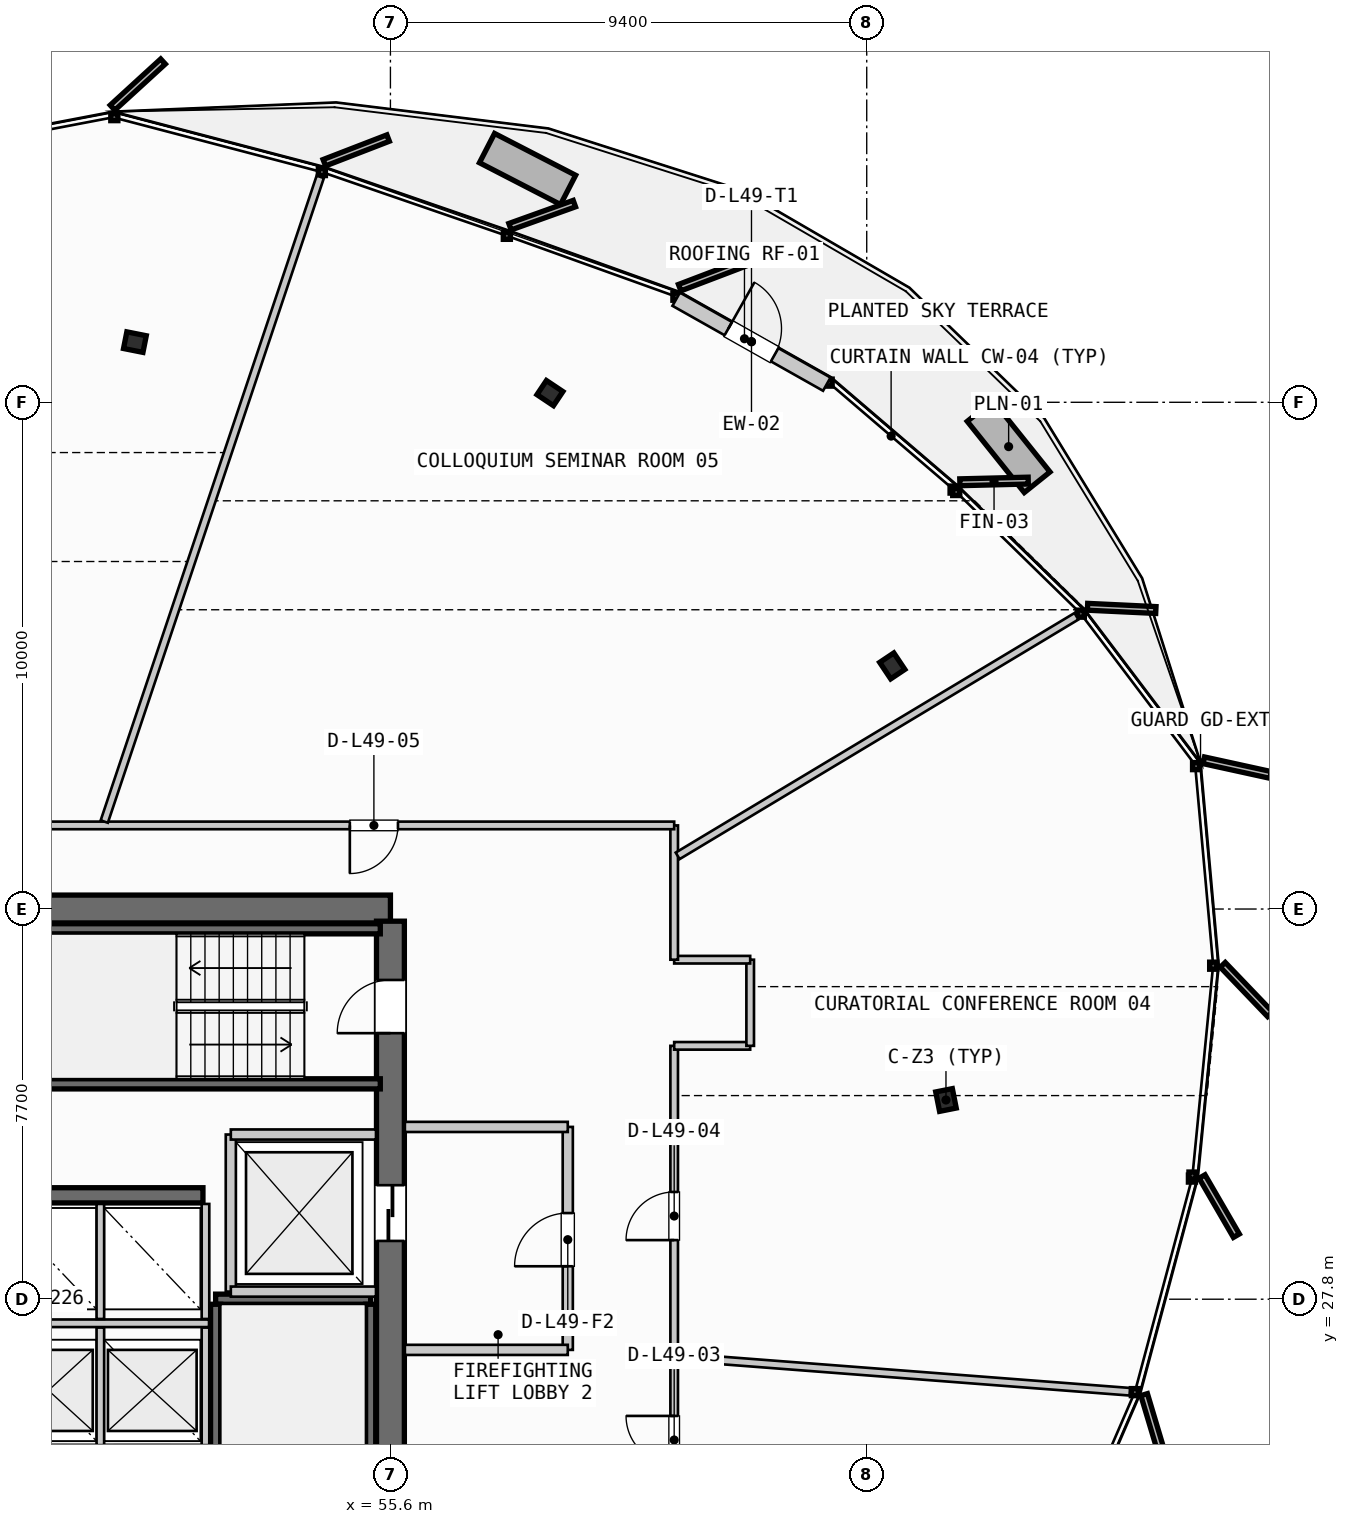
"""IFC4 building model, lengths in metres.
Left out: names, types, materials, properties, quantities, classifications, styles, units other than length and angle.
Written with IfcOpenShell. Run it as: python <this file> out.ifc"""

import sys

from ifc_helpers import new_model, si_unit, direction, frame, frame_2d, origin, origin_2d, place, context, subcontext, project, spatial, rectangle, i_section, extrude, source, transform, mapped, element, fill, save


model = new_model("IFC4")
c1 = context("Model", 3, precision=1e-05, world=origin(), true_north=direction((0.0, 1.0)))
c2 = subcontext(c1, "Body", "Model", "MODEL_VIEW")
j1 = project(units=[si_unit("LENGTHUNIT", "METRE"), si_unit("PLANEANGLEUNIT", "RADIAN")], contexts=[c1])
p1 = place(None, origin())
s1 = spatial("IfcSite", under=j1, at=p1, CompositionType="ELEMENT")
p2 = place(p1, origin())
s2 = spatial("IfcBuilding", under=s1, at=p2, CompositionType="ELEMENT")
p3 = place(p2, frame((0.0, 0.0, 190.4)))
s3 = spatial("IfcBuildingStorey", under=s2, at=p3, CompositionType="ELEMENT", Elevation=190.4)
p4 = place(p3, frame((55.6, 35.5, 0.0), z_axis=(0.0, 0.0, 1.0), x_axis=(-1.0, 0.0, 0.0)))
e1 = element("IfcWall", 1, at=p4, inside=s3, PredefinedType="SHEAR", context=c2, shape_type="SweptSolid", body=[
    extrude(rectangle(XDim=17.6, YDim=0.55, at=frame_2d((8.8, 0.0))), origin(), (0.0, 0.0, 1.0), 3.26),
])
p5 = place(p4, frame((8.05, 0.0, 0.0)))
e2 = element("IfcOpeningElement", 2, at=p5, cuts=e1, PredefinedType="OPENING", context=c2, shape_type="SweptSolid", body=[
    extrude(rectangle(XDim=1.5, YDim=2.2, at=frame_2d((0.75, 1.1))), frame((0.0, 0.285, 0.0), z_axis=(0.0, -1.0, 0.0), x_axis=(1.0, 0.0, 0.0)), (0.0, 0.0, 1.0), 0.57),
])
p6 = place(p4, frame((15.85, 0.0, 0.0)))
e3 = element("IfcOpeningElement", 3, at=p6, cuts=e1, PredefinedType="OPENING", context=c2, shape_type="SweptSolid", body=[
    extrude(rectangle(XDim=0.85, YDim=2.15, at=frame_2d((0.425, 1.075))), frame((0.0, 0.285, 0.0), z_axis=(0.0, -1.0, 0.0), x_axis=(1.0, 0.0, 0.0)), (0.0, 0.0, 1.0), 0.57),
])
p7 = place(p4, frame((14.35, 0.0, 0.0)))
e4 = element("IfcOpeningElement", 4, at=p7, cuts=e1, PredefinedType="OPENING", context=c2, shape_type="SweptSolid", body=[
    extrude(rectangle(XDim=0.85, YDim=2.15, at=frame_2d((0.425, 1.075))), frame((0.0, 0.285, 0.0), z_axis=(0.0, -1.0, 0.0), x_axis=(1.0, 0.0, 0.0)), (0.0, 0.0, 1.0), 0.57),
])
p8 = place(p4, frame((12.3, 0.0, 0.0)))
e5 = element("IfcOpeningElement", 5, at=p8, cuts=e1, PredefinedType="OPENING", context=c2, shape_type="SweptSolid", body=[
    extrude(rectangle(XDim=0.95, YDim=2.15, at=frame_2d((0.475, 1.075))), frame((0.0, 0.285, 0.0), z_axis=(0.0, -1.0, 0.0), x_axis=(1.0, 0.0, 0.0)), (0.0, 0.0, 1.0), 0.57),
])
p9 = place(p4, frame((10.2, 0.0, 0.0)))
e6 = element("IfcOpeningElement", 6, at=p9, cuts=e1, PredefinedType="OPENING", context=c2, shape_type="SweptSolid", body=[
    extrude(rectangle(XDim=0.9, YDim=2.15, at=frame_2d((0.45, 1.075))), frame((0.0, 0.285, 0.0), z_axis=(0.0, -1.0, 0.0), x_axis=(1.0, 0.0, 0.0)), (0.0, 0.0, 1.0), 0.57),
])
p10 = place(p3, frame((55.6, 20.34, 0.0), z_axis=(0.0, 0.0, 1.0), x_axis=(0.0, 1.0, 0.0)))
e7 = element("IfcWall", 7, at=p10, inside=s3, PredefinedType="SHEAR", context=c2, shape_type="SweptSolid", body=[
    extrude(rectangle(XDim=14.92, YDim=0.55, at=frame_2d((7.46, 0.0))), origin(), (0.0, 0.0, 1.0), 3.26),
])
p11 = place(p10, frame((12.71, 0.0, 0.0)))
e8 = element("IfcOpeningElement", 8, at=p11, cuts=e7, PredefinedType="OPENING", context=c2, shape_type="SweptSolid", body=[
    extrude(rectangle(XDim=1.05, YDim=2.15, at=frame_2d((0.525, 1.075))), frame((0.0, 0.285, 0.0), z_axis=(0.0, -1.0, 0.0), x_axis=(1.0, 0.0, 0.0)), (0.0, 0.0, 1.0), 0.57),
])
p12 = place(p10, frame((8.61, 0.0, 0.0)))
e9 = element("IfcOpeningElement", 9, at=p12, cuts=e7, PredefinedType="OPENING", context=c2, shape_type="SweptSolid", body=[
    extrude(rectangle(XDim=1.1, YDim=2.2, at=frame_2d((0.55, 1.1))), frame((0.0, 0.285, 0.0), z_axis=(0.0, -1.0, 0.0), x_axis=(1.0, 0.0, 0.0)), (0.0, 0.0, 1.0), 0.57),
])
p13 = place(p3, frame((47.65, 29.85, 0.0), z_axis=(0.0, 0.0, 1.0), x_axis=(1.0, 0.0, 0.0)))
e10 = element("IfcWall", 10, at=p13, inside=s3, PredefinedType="SHEAR", context=c2, shape_type="SweptSolid", body=[
    extrude(rectangle(XDim=4.25, YDim=0.3, at=frame_2d((2.125, 0.0))), origin(), (0.0, 0.0, 1.0), 3.26),
])
m1 = source(origin(), c2, "Body", "SweptSolid", [
    extrude(i_section(OverallWidth=0.391, OverallDepth=0.335, WebThickness=0.023, FlangeThickness=0.034, FilletRadius=0.015, at=origin_2d()), origin(), (0.0, 0.0, 1.0), 3.26),
])
for number, where, z_axis, x_axis in (
    (11, (66.564, 31.731, 0.0), (0.0, 0.0, 1.0), (0.981, 0.195, 0.0)),
    (12, (65.504, 40.298, 0.0), (0.0, 0.0, 1.0), (0.831, 0.556, 0.0)),
    (13, (58.748, 45.681, 0.0), (0.0, 0.0, 1.0), (0.556, 0.831, 0.0)),
    (14, (50.557, 46.688, 0.0), (0.0, 0.0, 1.0), (0.195, 0.981, 0.0)),
):
    element("IfcColumn", number, at=place(p3, frame(where, z_axis=z_axis, x_axis=x_axis)), inside=s3, PredefinedType="COLUMN", context=c2, shape_type="MappedRepresentation", body=[
        mapped(m1, transform((0.0, 0.0, 0.0), scale=1.0)),
    ])
p14 = place(p3, frame((61.24, 47.534, 0.0), z_axis=(0.0, 0.0, 1.0), x_axis=(0.870990242998, -0.491300312031, 0.0)))
e15 = element("IfcWall", 15, at=p14, inside=s3, PredefinedType="SOLIDWALL", context=c2, shape_type="SweptSolid", body=[
    extrude(rectangle(XDim=3.412, YDim=0.3, at=frame_2d((1.706, 0.0))), origin(), (0.0, 0.0, 1.0), 2.735),
])
p15 = place(p14, frame((1.181, 0.0, 0.0)))
e16 = element("IfcOpeningElement", 16, at=p15, cuts=e15, PredefinedType="OPENING", context=c2, shape_type="SweptSolid", body=[
    extrude(rectangle(XDim=1.05, YDim=2.2, at=frame_2d((0.525, 1.1))), frame((0.0, 0.16, 0.0), z_axis=(0.0, -1.0, 0.0), x_axis=(1.0, 0.0, 0.0)), (0.0, 0.0, 1.0), 0.32),
])
p16 = place(p3, frame((52.15, 27.8, 0.0), z_axis=(0.0, 0.0, 1.0), x_axis=(1.0, 0.0, 0.0)))
e17 = element("IfcWall", 17, at=p16, inside=s3, PredefinedType="SHEAR", context=c2, shape_type="SweptSolid", body=[
    extrude(rectangle(XDim=3.06, YDim=0.2, at=frame_2d((1.53, 0.0))), origin(), (0.0, 0.0, 1.0), 3.26),
])
for number, where, z_axis, x_axis in (
    (18, (55.21, 27.7, 0.0), (0.0, 0.0, 1.0), (0.0, -1.0, 0.0)),
    (19, (52.15, 20.35, 0.0), (0.0, 0.0, 1.0), (0.0, 1.0, 0.0)),
    (20, (48.05, 35.11, 0.0), (0.0, 0.0, 1.0), (1.0, 0.0, 0.0)),
    (21, (55.4, 32.05, 0.0), (0.0, 0.0, 1.0), (-1.0, 0.0, 0.0)),
):
    element("IfcWall", number, at=place(p3, frame(where, z_axis=z_axis, x_axis=x_axis)), inside=s3, PredefinedType="SHEAR", context=c2, shape_type="SweptSolid", body=[
        extrude(rectangle(XDim=7.35, YDim=0.2, at=frame_2d((3.675, 0.0))), origin(), (0.0, 0.0, 1.0), 3.26),
    ])
p17 = place(p3, frame((52.45, 27.95, 0.0), z_axis=(0.0, 0.0, 1.0), x_axis=(0.0, 1.0, 0.0)))
e22 = element("IfcWall", 22, at=p17, inside=s3, PredefinedType="PARTITIONING", context=c2, shape_type="SweptSolid", body=[
    extrude(rectangle(XDim=3.1, YDim=0.2, at=frame_2d((1.55, 0.0))), origin(), (0.0, 0.0, 1.0), 2.735),
])
for number, where, z_axis, x_axis in (
    (23, (52.45, 27.95, 0.0), (0.0, 0.0, 1.0), (1.0, 0.0, 0.0)),
    (24, (52.45, 31.05, 0.0), (0.0, 0.0, 1.0), (1.0, 0.0, 0.0)),
):
    element("IfcWall", number, at=place(p3, frame(where, z_axis=z_axis, x_axis=x_axis)), inside=s3, PredefinedType="PARTITIONING", context=c2, shape_type="SweptSolid", body=[
        extrude(rectangle(XDim=2.865, YDim=0.2, at=frame_2d((1.433, 0.0))), origin(), (0.0, 0.0, 1.0), 2.735),
    ])
p18 = place(p3, frame((59.1, 26.8, 0.0), z_axis=(0.0, 0.0, 1.0), x_axis=(0.0, 1.0, 0.0)))
e25 = element("IfcWall", 25, at=p18, inside=s3, PredefinedType="PARTITIONING", context=c2, shape_type="SweptSolid", body=[
    extrude(rectangle(XDim=4.4, YDim=0.2, at=frame_2d((2.2, 0.0))), origin(), (0.0, 0.0, 1.0), 2.735),
])
p19 = place(p18, frame((1.65, 0.0, 0.0)))
e26 = element("IfcOpeningElement", 26, at=p19, cuts=e25, PredefinedType="OPENING", context=c2, shape_type="SweptSolid", body=[
    extrude(rectangle(XDim=1.05, YDim=2.15, at=frame_2d((0.525, 1.075))), frame((0.0, 0.11, 0.0), z_axis=(0.0, -1.0, 0.0), x_axis=(1.0, 0.0, 0.0)), (0.0, 0.0, 1.0), 0.22),
])
for number, where, z_axis, x_axis in (
    (27, (55.885, 26.8, 0.0), (0.0, 0.0, 1.0), (1.0, 0.0, 0.0)),
    (28, (55.885, 31.2, 0.0), (0.0, 0.0, 1.0), (1.0, 0.0, 0.0)),
):
    element("IfcWall", number, at=place(p3, frame(where, z_axis=z_axis, x_axis=x_axis)), inside=s3, PredefinedType="PARTITIONING", context=c2, shape_type="SweptSolid", body=[
        extrude(rectangle(XDim=3.215, YDim=0.2, at=frame_2d((1.607, 0.0))), origin(), (0.0, 0.0, 1.0), 2.735),
    ])
p20 = place(p3, frame((47.7, 27.325, 0.0), z_axis=(0.0, 0.0, 1.0), x_axis=(1.0, 0.0, 0.0)))
e29 = element("IfcWall", 29, at=p20, inside=s3, PredefinedType="PARTITIONING", context=c2, shape_type="SweptSolid", body=[
    extrude(rectangle(XDim=4.32, YDim=0.15, at=frame_2d((2.16, 0.0))), origin(), (0.0, 0.0, 1.0), 2.735),
])
for number, where, z_axis, x_axis in (
    (30, (49.875, 24.92, 0.0), (0.0, 0.0, 1.0), (0.0, 1.0, 0.0)),
    (31, (51.95, 24.92, 0.0), (0.0, 0.0, 1.0), (0.0, 1.0, 0.0)),
):
    element("IfcWall", number, at=place(p3, frame(where, z_axis=z_axis, x_axis=x_axis)), inside=s3, PredefinedType="PARTITIONING", context=c2, shape_type="SweptSolid", body=[
        extrude(rectangle(XDim=2.32, YDim=0.15, at=frame_2d((1.16, 0.0))), origin(), (0.0, 0.0, 1.0), 2.735),
    ])
for number, where, z_axis, x_axis in (
    (32, (49.875, 27.41, 0.0), (0.0, 0.0, 1.0), (0.0, 1.0, 0.0)),
    (33, (51.95, 27.41, 0.0), (0.0, 0.0, 1.0), (0.0, 1.0, 0.0)),
):
    element("IfcWall", number, at=place(p3, frame(where, z_axis=z_axis, x_axis=x_axis)), inside=s3, PredefinedType="PARTITIONING", context=c2, shape_type="SweptSolid", body=[
        extrude(rectangle(XDim=2.27, YDim=0.15, at=frame_2d((1.135, 0.0))), origin(), (0.0, 0.0, 1.0), 2.735),
    ])
p21 = place(p3, frame((61.2, 22.8, 0.0), z_axis=(0.0, 0.0, 1.0), x_axis=(0.0, 1.0, 0.0)))
e34 = element("IfcWall", 34, at=p21, inside=s3, PredefinedType="PARTITIONING", context=c2, shape_type="SweptSolid", body=[
    extrude(rectangle(XDim=10.0, YDim=0.15, at=frame_2d((5.0, 0.0))), origin(), (0.0, 0.0, 1.0), 2.735),
])
p22 = place(p21, frame((1.747, 0.0, 0.0)))
e35 = element("IfcOpeningElement", 35, at=p22, cuts=e34, PredefinedType="OPENING", context=c2, shape_type="SweptSolid", body=[
    extrude(rectangle(XDim=0.95, YDim=2.15, at=frame_2d((0.475, 1.075))), frame((0.0, 0.085, 0.0), z_axis=(0.0, -1.0, 0.0), x_axis=(1.0, 0.0, 0.0)), (0.0, 0.0, 1.0), 0.17),
])
p23 = place(p21, frame((6.167, 0.0, 0.0)))
e36 = element("IfcOpeningElement", 36, at=p23, cuts=e34, PredefinedType="OPENING", context=c2, shape_type="SweptSolid", body=[
    extrude(rectangle(XDim=0.95, YDim=2.15, at=frame_2d((0.475, 1.075))), frame((0.0, 0.085, 0.0), z_axis=(0.0, -1.0, 0.0), x_axis=(1.0, 0.0, 0.0)), (0.0, 0.0, 1.0), 0.17),
])
p24 = place(p3, frame((61.2, 32.8, 0.0), z_axis=(0.0, 0.0, 1.0), x_axis=(1.0, 0.0, 0.0)))
e37 = element("IfcWall", 37, at=p24, inside=s3, PredefinedType="PARTITIONING", context=c2, shape_type="SweptSolid", body=[
    extrude(rectangle(XDim=1.5, YDim=0.15, at=frame_2d((0.75, 0.0))), origin(), (0.0, 0.0, 1.0), 2.735),
])
p25 = place(p3, frame((62.7, 32.8, 0.0), z_axis=(0.0, 0.0, 1.0), x_axis=(0.0, 1.0, 0.0)))
e38 = element("IfcWall", 38, at=p25, inside=s3, PredefinedType="PARTITIONING", context=c2, shape_type="SweptSolid", body=[
    extrude(rectangle(XDim=1.7, YDim=0.15, at=frame_2d((0.85, 0.0))), origin(), (0.0, 0.0, 1.0), 2.735),
])
p26 = place(p3, frame((62.7, 34.5, 0.0), z_axis=(0.0, 0.0, 1.0), x_axis=(-1.0, 0.0, 0.0)))
e39 = element("IfcWall", 39, at=p26, inside=s3, PredefinedType="PARTITIONING", context=c2, shape_type="SweptSolid", body=[
    extrude(rectangle(XDim=1.5, YDim=0.15, at=frame_2d((0.75, 0.0))), origin(), (0.0, 0.0, 1.0), 2.735),
])
p27 = place(p3, frame((61.2, 34.5, 0.0), z_axis=(0.0, 0.0, 1.0), x_axis=(0.0, 1.0, 0.0)))
e40 = element("IfcWall", 40, at=p27, inside=s3, PredefinedType="PARTITIONING", context=c2, shape_type="SweptSolid", body=[
    extrude(rectangle(XDim=2.65, YDim=0.15, at=frame_2d((1.325, 0.0))), origin(), (0.0, 0.0, 1.0), 2.735),
])
p28 = place(p3, frame((61.2, 37.15, 0.0), z_axis=(0.0, 0.0, 1.0), x_axis=(-1.0, 0.0, 0.0)))
e41 = element("IfcWall", 41, at=p28, inside=s3, PredefinedType="PARTITIONING", context=c2, shape_type="SweptSolid", body=[
    extrude(rectangle(XDim=28.35, YDim=0.15, at=frame_2d((14.175, 0.0))), origin(), (0.0, 0.0, 1.0), 2.735),
])
p29 = place(p28, frame((5.451, 0.0, 0.0)))
e42 = element("IfcOpeningElement", 42, at=p29, cuts=e41, PredefinedType="OPENING", context=c2, shape_type="SweptSolid", body=[
    extrude(rectangle(XDim=0.95, YDim=2.15, at=frame_2d((0.475, 1.075))), frame((0.0, 0.085, 0.0), z_axis=(0.0, -1.0, 0.0), x_axis=(1.0, 0.0, 0.0)), (0.0, 0.0, 1.0), 0.17),
])
p30 = place(p28, frame((18.176, 0.0, 0.0)))
e43 = element("IfcOpeningElement", 43, at=p30, cuts=e41, PredefinedType="OPENING", context=c2, shape_type="SweptSolid", body=[
    extrude(rectangle(XDim=0.95, YDim=2.15, at=frame_2d((0.475, 1.075))), frame((0.0, 0.085, 0.0), z_axis=(0.0, -1.0, 0.0), x_axis=(1.0, 0.0, 0.0)), (0.0, 0.0, 1.0), 0.17),
])
p31 = place(p3, frame((61.28, 26.658, 0.0), z_axis=(0.0, 0.0, 1.0), x_axis=(0.997071171595, -0.07647927023, 0.0)))
e44 = element("IfcWall", 44, at=p31, inside=s3, PredefinedType="PARTITIONING", context=c2, shape_type="SweptSolid", body=[
    extrude(rectangle(XDim=8.938, YDim=0.15, at=frame_2d((4.469, 0.0))), origin(), (0.0, 0.0, 1.0), 2.735),
])
p32 = place(p3, frame((61.269, 36.549, 0.0), z_axis=(0.0, 0.0, 1.0), x_axis=(0.857232382987, 0.514929744294, 0.0)))
e45 = element("IfcWall", 45, at=p32, inside=s3, PredefinedType="PARTITIONING", context=c2, shape_type="SweptSolid", body=[
    extrude(rectangle(XDim=9.181, YDim=0.15, at=frame_2d((4.591, 0.0))), origin(), (0.0, 0.0, 1.0), 2.735),
])
p33 = place(p3, frame((49.952, 37.226, 0.0), z_axis=(0.0, 0.0, 1.0), x_axis=(0.317695690464, 0.948192727382, 0.0)))
e46 = element("IfcWall", 46, at=p33, inside=s3, PredefinedType="PARTITIONING", context=c2, shape_type="SweptSolid", body=[
    extrude(rectangle(XDim=13.418, YDim=0.15, at=frame_2d((6.709, 0.0))), origin(), (0.0, 0.0, 1.0), 2.735),
])
m2 = source(origin(), c2, "Body", "SweptSolid", [
    extrude(rectangle(XDim=1.05, YDim=2.2, at=frame_2d((0.525, 1.1))), frame((0.0, 0.025, 0.0), z_axis=(0.0, -1.0, 0.0), x_axis=(1.0, 0.0, 0.0)), (0.0, 0.0, 1.0), 0.05),
])
p34 = place(p15, origin())
e47 = element("IfcDoor", 47, at=p34, inside=s3, OperationType="SINGLE_SWING_LEFT", PredefinedType="DOOR", context=c2, shape_type="MappedRepresentation", body=[
    mapped(m2, transform((0.0, 0.0, 0.0), scale=1.0)),
])
fill(e16, e47)
m3 = source(origin(), c2, "Body", "SweptSolid", [
    extrude(rectangle(XDim=1.05, YDim=2.15, at=frame_2d((0.525, 1.075))), frame((0.0, 0.025, 0.0), z_axis=(0.0, -1.0, 0.0), x_axis=(1.0, 0.0, 0.0)), (0.0, 0.0, 1.0), 0.05),
])
p35 = place(p11, origin())
e48 = element("IfcDoor", 48, at=p35, inside=s3, OperationType="SINGLE_SWING_LEFT", PredefinedType="DOOR", context=c2, shape_type="MappedRepresentation", body=[
    mapped(m3, transform((0.0, 0.0, 0.0), scale=1.0)),
])
fill(e8, e48)
m4 = source(origin(), c2, "Body", "SweptSolid", [
    extrude(rectangle(XDim=1.1, YDim=2.2, at=frame_2d((0.55, 1.1))), frame((0.0, 0.025, 0.0), z_axis=(0.0, -1.0, 0.0), x_axis=(1.0, 0.0, 0.0)), (0.0, 0.0, 1.0), 0.05),
])
p36 = place(p12, origin())
e49 = element("IfcDoor", 49, at=p36, inside=s3, OperationType="SLIDING_TO_RIGHT", PredefinedType="DOOR", context=c2, shape_type="MappedRepresentation", body=[
    mapped(m4, transform((0.0, 0.0, 0.0), scale=1.0)),
])
fill(e9, e49)
p37 = place(p19, origin())
e50 = element("IfcDoor", 50, at=p37, inside=s3, OperationType="SINGLE_SWING_LEFT", PredefinedType="DOOR", context=c2, shape_type="MappedRepresentation", body=[
    mapped(m3, transform((0.0, 0.0, 0.0), scale=1.0)),
])
fill(e26, e50)
m5 = source(origin(), c2, "Body", "SweptSolid", [
    extrude(rectangle(XDim=0.95, YDim=2.15, at=frame_2d((0.475, 1.075))), frame((0.0, 0.025, 0.0), z_axis=(0.0, -1.0, 0.0), x_axis=(1.0, 0.0, 0.0)), (0.0, 0.0, 1.0), 0.05),
])
p38 = place(p22, origin())
e51 = element("IfcDoor", 51, at=p38, inside=s3, OperationType="SINGLE_SWING_RIGHT", PredefinedType="DOOR", context=c2, shape_type="MappedRepresentation", body=[
    mapped(m5, transform((0.0, 0.0, 0.0), scale=1.0)),
])
fill(e35, e51)
p39 = place(p23, origin())
e52 = element("IfcDoor", 52, at=p39, inside=s3, OperationType="SINGLE_SWING_LEFT", PredefinedType="DOOR", context=c2, shape_type="MappedRepresentation", body=[
    mapped(m5, transform((0.0, 0.0, 0.0), scale=1.0)),
])
fill(e36, e52)
p40 = place(p29, origin())
e53 = element("IfcDoor", 53, at=p40, inside=s3, OperationType="SINGLE_SWING_RIGHT", PredefinedType="DOOR", context=c2, shape_type="MappedRepresentation", body=[
    mapped(m5, transform((0.0, 0.0, 0.0), scale=1.0)),
])
fill(e42, e53)
save(model, sys.argv[1])
